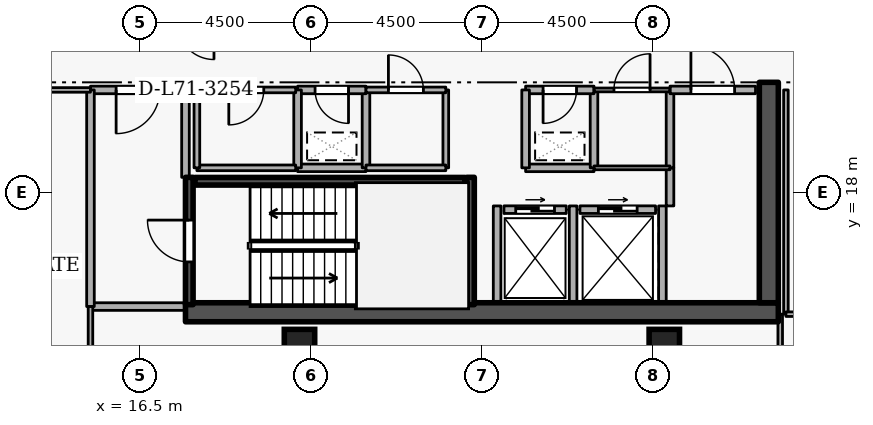
"""IFC4 building model, lengths in metres.
Left out: names, types, materials, properties, quantities, classifications, styles, units other than length and angle.
Written with IfcOpenShell. Run it as: python <this file> out.ifc"""

import sys

from ifc_helpers import new_model, si_unit, direction, frame, frame_2d, origin, origin_2d, place, context, subcontext, project, spatial, rectangle, extrude, element, fill, save


model = new_model("IFC4")
c1 = context("Model", 3, precision=1e-05, world=origin(), true_north=direction((0.0, 1.0)))
c2 = subcontext(c1, "Body", "Model", "MODEL_VIEW")
j1 = project(units=[si_unit("LENGTHUNIT", "METRE"), si_unit("PLANEANGLEUNIT", "RADIAN")], contexts=[c1])
p1 = place(None, origin())
s1 = spatial("IfcSite", under=j1, at=p1, CompositionType="ELEMENT")
p2 = place(p1, origin())
s2 = spatial("IfcBuilding", under=s1, at=p2, CompositionType="ELEMENT")
p3 = place(p2, frame((0.0, 0.0, 265.5)))
s3 = spatial("IfcBuildingStorey", under=s2, at=p3, CompositionType="ELEMENT", Elevation=265.5)
p4 = place(p3, frame((17.7, 14.85, 0.0), z_axis=(0.0, 0.0, 1.0), x_axis=(1.0, 0.0, 0.0)))
e1 = element("IfcWall", 1, at=p4, inside=s3, PredefinedType="SHEAR", context=c2, shape_type="SweptSolid", body=[
    extrude(rectangle(XDim=15.6, YDim=0.5, at=frame_2d((7.8, 0.0))), origin(), (0.0, 0.0, 1.0), 3.6),
])
p5 = place(p3, frame((33.05, 15.1, 0.0), z_axis=(0.0, 0.0, 1.0), x_axis=(0.0, 1.0, 0.0)))
e2 = element("IfcWall", 2, at=p5, inside=s3, PredefinedType="SHEAR", context=c2, shape_type="SweptSolid", body=[
    extrude(rectangle(XDim=5.8, YDim=0.5, at=frame_2d((2.9, 0.0))), origin(), (0.0, 0.0, 1.0), 3.6),
])
for number, where, z_axis, x_axis in (
    (3, (20.7, 14.0, 0.0), (0.0, 0.0, 1.0), (1.0, 0.0, 0.0)),
    (4, (30.3, 14.0, 0.0), (0.0, 0.0, 1.0), (1.0, 0.0, 0.0)),
):
    element("IfcColumn", number, at=place(p3, frame(where, z_axis=z_axis, x_axis=x_axis)), inside=s3, PredefinedType="COLUMN", context=c2, shape_type="SweptSolid", body=[
        extrude(rectangle(XDim=0.8, YDim=0.8, at=origin_2d()), origin(), (0.0, 0.0, 1.0), 3.6),
    ])
p6 = place(p3, frame((26.08, 17.55, 0.0), z_axis=(0.0, 0.0, 1.0), x_axis=(1.0, 0.0, 0.0)))
e5 = element("IfcWall", 5, at=p6, inside=s3, PredefinedType="STANDARD", context=c2, shape_type="SweptSolid", body=[
    extrude(rectangle(XDim=1.64, YDim=0.2, at=frame_2d((0.82, 0.0))), origin(), (0.0, 0.0, 1.0), 3.34),
])
p7 = place(p6, frame((0.31, 0.0, 0.0)))
e6 = element("IfcOpeningElement", 6, at=p7, cuts=e5, PredefinedType="OPENING", context=c2, shape_type="SweptSolid", body=[
    extrude(rectangle(XDim=1.02, YDim=2.06, at=frame_2d((0.51, 1.03))), frame((0.0, 0.11, 0.0), z_axis=(0.0, -1.0, 0.0), x_axis=(1.0, 0.0, 0.0)), (0.0, 0.0, 1.0), 0.22),
])
p8 = place(p3, frame((28.08, 17.55, 0.0), z_axis=(0.0, 0.0, 1.0), x_axis=(1.0, 0.0, 0.0)))
e7 = element("IfcWall", 7, at=p8, inside=s3, PredefinedType="STANDARD", context=c2, shape_type="SweptSolid", body=[
    extrude(rectangle(XDim=1.99, YDim=0.2, at=frame_2d((0.995, 0.0))), origin(), (0.0, 0.0, 1.0), 3.34),
])
p9 = place(p8, frame((0.485, 0.0, 0.0)))
e8 = element("IfcOpeningElement", 8, at=p9, cuts=e7, PredefinedType="OPENING", context=c2, shape_type="SweptSolid", body=[
    extrude(rectangle(XDim=1.02, YDim=2.06, at=frame_2d((0.51, 1.03))), frame((0.0, 0.11, 0.0), z_axis=(0.0, -1.0, 0.0), x_axis=(1.0, 0.0, 0.0)), (0.0, 0.0, 1.0), 0.22),
])
for number, where, z_axis, x_axis in (
    (9, (27.9, 15.112, 0.0), (0.0, 0.0, 1.0), (0.0, 1.0, 0.0)),
    (10, (25.9, 15.112, 0.0), (0.0, 0.0, 1.0), (0.0, 1.0, 0.0)),
    (11, (30.25, 15.112, 0.0), (0.0, 0.0, 1.0), (0.0, 1.0, 0.0)),
):
    element("IfcWall", number, at=place(p3, frame(where, z_axis=z_axis, x_axis=x_axis)), inside=s3, PredefinedType="STANDARD", context=c2, shape_type="SweptSolid", body=[
        extrude(rectangle(XDim=2.536, YDim=0.2, at=frame_2d((1.268, 0.0))), origin(), (0.0, 0.0, 1.0), 3.34),
    ])
p10 = place(p3, frame((17.8, 15.05, 0.0), z_axis=(0.0, 0.0, 1.0), x_axis=(0.0, 1.0, 0.0)))
e12 = element("IfcWall", 12, at=p10, inside=s3, PredefinedType="SHEAR", context=c2, shape_type="SweptSolid", body=[
    extrude(rectangle(XDim=3.35, YDim=0.2, at=frame_2d((1.675, 0.0))), origin(), (0.0, 0.0, 1.0), 3.6),
])
p11 = place(p10, frame((1.125, 0.0, 0.0)))
e13 = element("IfcOpeningElement", 13, at=p11, cuts=e12, PredefinedType="OPENING", context=c2, shape_type="SweptSolid", body=[
    extrude(rectangle(XDim=1.1, YDim=2.1, at=frame_2d((0.55, 1.05))), frame((0.0, 0.11, 0.0), z_axis=(0.0, -1.0, 0.0), x_axis=(1.0, 0.0, 0.0)), (0.0, 0.0, 1.0), 0.22),
])
p12 = place(p3, frame((25.2, 18.4, 0.0), z_axis=(0.0, 0.0, 1.0), x_axis=(0.0, -1.0, 0.0)))
e14 = element("IfcWall", 14, at=p12, inside=s3, PredefinedType="SHEAR", context=c2, shape_type="SweptSolid", body=[
    extrude(rectangle(XDim=3.35, YDim=0.2, at=frame_2d((1.675, 0.0))), origin(), (0.0, 0.0, 1.0), 3.6),
])
p13 = place(p3, frame((25.05, 18.297, 0.0), z_axis=(0.0, 0.0, 1.0), x_axis=(-1.0, 0.0, 0.0)))
e15 = element("IfcWall", 15, at=p13, inside=s3, PredefinedType="SHEAR", context=c2, shape_type="SweptSolid", body=[
    extrude(rectangle(XDim=7.1, YDim=0.2, at=frame_2d((3.55, 0.0))), origin(), (0.0, 0.0, 1.0), 3.6),
])
p14 = place(p3, frame((15.2, 15.0, 0.0), z_axis=(0.0, 0.0, 1.0), x_axis=(1.0, 0.0, 0.0)))
e16 = element("IfcWall", 16, at=p14, inside=s3, PredefinedType="STANDARD", context=c2, shape_type="SweptSolid", body=[
    extrude(rectangle(XDim=2.5, YDim=0.2, at=frame_2d((1.25, 0.0))), origin(), (0.0, 0.0, 1.0), 3.34),
])
p15 = place(p3, frame((17.7, 18.4, 0.0), z_axis=(0.0, 0.0, 1.0), x_axis=(0.0, 1.0, 0.0)))
e17 = element("IfcWall", 17, at=p15, inside=s3, PredefinedType="STANDARD", context=c2, shape_type="SweptSolid", body=[
    extrude(rectangle(XDim=2.3, YDim=0.2, at=frame_2d((1.15, 0.0))), origin(), (0.0, 0.0, 1.0), 2.545),
])
p16 = place(p3, frame((17.7, 20.7, 0.0), z_axis=(0.0, 0.0, 1.0), x_axis=(-1.0, 0.0, 0.0)))
e18 = element("IfcWall", 18, at=p16, inside=s3, PredefinedType="STANDARD", context=c2, shape_type="SweptSolid", body=[
    extrude(rectangle(XDim=2.5, YDim=0.2, at=frame_2d((1.25, 0.0))), origin(), (0.0, 0.0, 1.0), 3.34),
])
p17 = place(p16, frame((0.675, 0.0, 0.0)))
e19 = element("IfcOpeningElement", 19, at=p17, cuts=e18, PredefinedType="OPENING", context=c2, shape_type="SweptSolid", body=[
    extrude(rectangle(XDim=1.15, YDim=2.1, at=frame_2d((0.575, 1.05))), frame((0.0, 0.11, 0.0), z_axis=(0.0, -1.0, 0.0), x_axis=(1.0, 0.0, 0.0)), (0.0, 0.0, 1.0), 0.22),
])
p18 = place(p3, frame((15.2, 20.7, 0.0), z_axis=(0.0, 0.0, 1.0), x_axis=(0.0, -1.0, 0.0)))
e20 = element("IfcWall", 20, at=p18, inside=s3, PredefinedType="STANDARD", context=c2, shape_type="SweptSolid", body=[
    extrude(rectangle(XDim=5.7, YDim=0.2, at=frame_2d((2.85, 0.0))), origin(), (0.0, 0.0, 1.0), 3.34),
])
p19 = place(p3, frame((26.65, 18.65, 0.0), z_axis=(0.0, 0.0, 1.0), x_axis=(1.0, 0.0, 0.0)))
e21 = element("IfcWall", 21, at=p19, inside=s3, PredefinedType="STANDARD", context=c2, shape_type="SweptSolid", body=[
    extrude(rectangle(XDim=1.8, YDim=0.2, at=frame_2d((0.9, 0.0))), origin(), (0.0, 0.0, 1.0), 3.34),
])
p20 = place(p3, frame((28.45, 18.65, 0.0), z_axis=(0.0, 0.0, 1.0), x_axis=(0.0, 1.0, 0.0)))
e22 = element("IfcWall", 22, at=p20, inside=s3, PredefinedType="STANDARD", context=c2, shape_type="SweptSolid", body=[
    extrude(rectangle(XDim=2.05, YDim=0.2, at=frame_2d((1.025, 0.0))), origin(), (0.0, 0.0, 1.0), 3.34),
])
p21 = place(p3, frame((28.45, 20.7, 0.0), z_axis=(0.0, 0.0, 1.0), x_axis=(-1.0, 0.0, 0.0)))
e23 = element("IfcWall", 23, at=p21, inside=s3, PredefinedType="STANDARD", context=c2, shape_type="SweptSolid", body=[
    extrude(rectangle(XDim=1.8, YDim=0.2, at=frame_2d((0.9, 0.0))), origin(), (0.0, 0.0, 1.0), 3.34),
])
p22 = place(p21, frame((0.46, 0.0, 0.0)))
e24 = element("IfcOpeningElement", 24, at=p22, cuts=e23, PredefinedType="OPENING", context=c2, shape_type="SweptSolid", body=[
    extrude(rectangle(XDim=0.88, YDim=2.04, at=frame_2d((0.44, 1.02))), frame((0.0, 0.11, 0.0), z_axis=(0.0, -1.0, 0.0), x_axis=(1.0, 0.0, 0.0)), (0.0, 0.0, 1.0), 0.22),
])
p23 = place(p3, frame((26.65, 20.7, 0.0), z_axis=(0.0, 0.0, 1.0), x_axis=(0.0, -1.0, 0.0)))
e25 = element("IfcWall", 25, at=p23, inside=s3, PredefinedType="STANDARD", context=c2, shape_type="SweptSolid", body=[
    extrude(rectangle(XDim=2.05, YDim=0.2, at=frame_2d((1.025, 0.0))), origin(), (0.0, 0.0, 1.0), 3.34),
])
p24 = place(p3, frame((20.65, 18.65, 0.0), z_axis=(0.0, 0.0, 1.0), x_axis=(1.0, 0.0, 0.0)))
e26 = element("IfcWall", 26, at=p24, inside=s3, PredefinedType="STANDARD", context=c2, shape_type="SweptSolid", body=[
    extrude(rectangle(XDim=1.8, YDim=0.2, at=frame_2d((0.9, 0.0))), origin(), (0.0, 0.0, 1.0), 3.34),
])
p25 = place(p3, frame((22.45, 18.65, 0.0), z_axis=(0.0, 0.0, 1.0), x_axis=(0.0, 1.0, 0.0)))
e27 = element("IfcWall", 27, at=p25, inside=s3, PredefinedType="STANDARD", context=c2, shape_type="SweptSolid", body=[
    extrude(rectangle(XDim=2.05, YDim=0.2, at=frame_2d((1.025, 0.0))), origin(), (0.0, 0.0, 1.0), 3.34),
])
p26 = place(p3, frame((22.45, 20.7, 0.0), z_axis=(0.0, 0.0, 1.0), x_axis=(-1.0, 0.0, 0.0)))
e28 = element("IfcWall", 28, at=p26, inside=s3, PredefinedType="STANDARD", context=c2, shape_type="SweptSolid", body=[
    extrude(rectangle(XDim=1.8, YDim=0.2, at=frame_2d((0.9, 0.0))), origin(), (0.0, 0.0, 1.0), 3.34),
])
p27 = place(p26, frame((0.46, 0.0, 0.0)))
e29 = element("IfcOpeningElement", 29, at=p27, cuts=e28, PredefinedType="OPENING", context=c2, shape_type="SweptSolid", body=[
    extrude(rectangle(XDim=0.88, YDim=2.04, at=frame_2d((0.44, 1.02))), frame((0.0, 0.11, 0.0), z_axis=(0.0, -1.0, 0.0), x_axis=(1.0, 0.0, 0.0)), (0.0, 0.0, 1.0), 0.22),
])
p28 = place(p3, frame((20.65, 20.7, 0.0), z_axis=(0.0, 0.0, 1.0), x_axis=(0.0, -1.0, 0.0)))
e30 = element("IfcWall", 30, at=p28, inside=s3, PredefinedType="STANDARD", context=c2, shape_type="SweptSolid", body=[
    extrude(rectangle(XDim=2.05, YDim=0.2, at=frame_2d((1.025, 0.0))), origin(), (0.0, 0.0, 1.0), 3.34),
])
p29 = place(p3, frame((30.45, 17.648, 0.0), z_axis=(0.0, 0.0, 1.0), x_axis=(0.0, 1.0, 0.0)))
e31 = element("IfcWall", 31, at=p29, inside=s3, PredefinedType="STANDARD", context=c2, shape_type="SweptSolid", body=[
    extrude(rectangle(XDim=1.002, YDim=0.2, at=frame_2d((0.501, 0.0))), origin(), (0.0, 0.0, 1.0), 3.34),
])
p30 = place(p3, frame((30.45, 18.65, 0.0), z_axis=(0.0, 0.0, 1.0), x_axis=(0.0, 1.0, 0.0)))
e32 = element("IfcWall", 32, at=p30, inside=s3, PredefinedType="STANDARD", context=c2, shape_type="SweptSolid", body=[
    extrude(rectangle(XDim=2.05, YDim=0.2, at=frame_2d((1.025, 0.0))), origin(), (0.0, 0.0, 1.0), 3.34),
])
p31 = place(p3, frame((30.45, 20.7, 0.0), z_axis=(0.0, 0.0, 1.0), x_axis=(1.0, 0.0, 0.0)))
e33 = element("IfcWall", 33, at=p31, inside=s3, PredefinedType="STANDARD", context=c2, shape_type="SweptSolid", body=[
    extrude(rectangle(XDim=2.25, YDim=0.2, at=frame_2d((1.125, 0.0))), origin(), (0.0, 0.0, 1.0), 3.34),
])
p32 = place(p31, frame((0.55, 0.0, 0.0)))
e34 = element("IfcOpeningElement", 34, at=p32, cuts=e33, PredefinedType="OPENING", context=c2, shape_type="SweptSolid", body=[
    extrude(rectangle(XDim=1.15, YDim=2.1, at=frame_2d((0.575, 1.05))), frame((0.0, 0.11, 0.0), z_axis=(0.0, -1.0, 0.0), x_axis=(1.0, 0.0, 0.0)), (0.0, 0.0, 1.0), 0.22),
])
p33 = place(p3, frame((18.0, 18.65, 0.0), z_axis=(0.0, 0.0, 1.0), x_axis=(1.0, 0.0, 0.0)))
e35 = element("IfcWall", 35, at=p33, inside=s3, PredefinedType="PARTITIONING", context=c2, shape_type="SweptSolid", body=[
    extrude(rectangle(XDim=2.6, YDim=0.15, at=frame_2d((1.3, 0.0))), origin(), (0.0, 0.0, 1.0), 3.34),
])
p34 = place(p3, frame((20.6, 20.7, 0.0), z_axis=(0.0, 0.0, 1.0), x_axis=(-1.0, 0.0, 0.0)))
e36 = element("IfcWall", 36, at=p34, inside=s3, PredefinedType="PARTITIONING", context=c2, shape_type="SweptSolid", body=[
    extrude(rectangle(XDim=2.6, YDim=0.15, at=frame_2d((1.3, 0.0))), origin(), (0.0, 0.0, 1.0), 3.34),
])
p35 = place(p34, frame((0.84, 0.0, 0.0)))
e37 = element("IfcOpeningElement", 37, at=p35, cuts=e36, PredefinedType="OPENING", context=c2, shape_type="SweptSolid", body=[
    extrude(rectangle(XDim=0.92, YDim=2.08, at=frame_2d((0.46, 1.04))), frame((0.0, 0.085, 0.0), z_axis=(0.0, -1.0, 0.0), x_axis=(1.0, 0.0, 0.0)), (0.0, 0.0, 1.0), 0.17),
])
p36 = place(p3, frame((18.0, 20.7, 0.0), z_axis=(0.0, 0.0, 1.0), x_axis=(0.0, -1.0, 0.0)))
e38 = element("IfcWall", 38, at=p36, inside=s3, PredefinedType="PARTITIONING", context=c2, shape_type="SweptSolid", body=[
    extrude(rectangle(XDim=2.05, YDim=0.15, at=frame_2d((1.025, 0.0))), origin(), (0.0, 0.0, 1.0), 2.545),
])
p37 = place(p3, frame((24.55, 20.7, 0.0), z_axis=(0.0, 0.0, 1.0), x_axis=(0.0, -1.0, 0.0)))
e39 = element("IfcWall", 39, at=p37, inside=s3, PredefinedType="PARTITIONING", context=c2, shape_type="SweptSolid", body=[
    extrude(rectangle(XDim=2.05, YDim=0.15, at=frame_2d((1.025, 0.0))), origin(), (0.0, 0.0, 1.0), 3.34),
])
p38 = place(p3, frame((24.55, 18.65, 0.0), z_axis=(0.0, 0.0, 1.0), x_axis=(-1.0, 0.0, 0.0)))
e40 = element("IfcWall", 40, at=p38, inside=s3, PredefinedType="PARTITIONING", context=c2, shape_type="SweptSolid", body=[
    extrude(rectangle(XDim=2.1, YDim=0.15, at=frame_2d((1.05, 0.0))), origin(), (0.0, 0.0, 1.0), 3.34),
])
p39 = place(p3, frame((22.45, 20.7, 0.0), z_axis=(0.0, 0.0, 1.0), x_axis=(1.0, 0.0, 0.0)))
e41 = element("IfcWall", 41, at=p39, inside=s3, PredefinedType="PARTITIONING", context=c2, shape_type="SweptSolid", body=[
    extrude(rectangle(XDim=2.1, YDim=0.15, at=frame_2d((1.05, 0.0))), origin(), (0.0, 0.0, 1.0), 3.34),
])
p40 = place(p39, frame((0.59, 0.0, 0.0)))
e42 = element("IfcOpeningElement", 42, at=p40, cuts=e41, PredefinedType="OPENING", context=c2, shape_type="SweptSolid", body=[
    extrude(rectangle(XDim=0.92, YDim=2.08, at=frame_2d((0.46, 1.04))), frame((0.0, 0.085, 0.0), z_axis=(0.0, -1.0, 0.0), x_axis=(1.0, 0.0, 0.0)), (0.0, 0.0, 1.0), 0.17),
])
p41 = place(p3, frame((30.45, 18.65, 0.0), z_axis=(0.0, 0.0, 1.0), x_axis=(-1.0, 0.0, 0.0)))
e43 = element("IfcWall", 43, at=p41, inside=s3, PredefinedType="PARTITIONING", context=c2, shape_type="SweptSolid", body=[
    extrude(rectangle(XDim=2.0, YDim=0.1, at=frame_2d((1.0, 0.0))), origin(), (0.0, 0.0, 1.0), 3.34),
])
p42 = place(p3, frame((28.45, 20.7, 0.0), z_axis=(0.0, 0.0, 1.0), x_axis=(1.0, 0.0, 0.0)))
e44 = element("IfcWall", 44, at=p42, inside=s3, PredefinedType="PARTITIONING", context=c2, shape_type="SweptSolid", body=[
    extrude(rectangle(XDim=2.0, YDim=0.1, at=frame_2d((1.0, 0.0))), origin(), (0.0, 0.0, 1.0), 3.34),
])
p43 = place(p42, frame((0.525, 0.0, 0.0)))
e45 = element("IfcOpeningElement", 45, at=p43, cuts=e44, PredefinedType="OPENING", context=c2, shape_type="SweptSolid", body=[
    extrude(rectangle(XDim=0.95, YDim=2.1, at=frame_2d((0.475, 1.05))), frame((0.0, 0.06, 0.0), z_axis=(0.0, -1.0, 0.0), x_axis=(1.0, 0.0, 0.0)), (0.0, 0.0, 1.0), 0.12),
])
p44 = place(p3, frame((33.5, 20.7, 0.0), z_axis=(0.0, 0.0, 1.0), x_axis=(0.0, -1.0, 0.0)))
e46 = element("IfcWall", 46, at=p44, inside=s3, PredefinedType="PARTITIONING", context=c2, shape_type="SweptSolid", body=[
    extrude(rectangle(XDim=5.9, YDim=0.12, at=frame_2d((2.95, 0.0))), origin(), (0.0, 0.0, 1.0), 3.34),
])
p45 = place(p3, frame((33.5, 14.8, 0.0), z_axis=(0.0, 0.0, 1.0), x_axis=(1.0, 0.0, 0.0)))
e47 = element("IfcWall", 47, at=p45, inside=s3, PredefinedType="PARTITIONING", context=c2, shape_type="SweptSolid", body=[
    extrude(rectangle(XDim=1.85, YDim=0.12, at=frame_2d((0.925, 0.0))), origin(), (0.0, 0.0, 1.0), 3.34),
])
p46 = place(p45, frame((0.45, 0.0, 0.0)))
e48 = element("IfcOpeningElement", 48, at=p46, cuts=e47, PredefinedType="OPENING", context=c2, shape_type="SweptSolid", body=[
    extrude(rectangle(XDim=0.95, YDim=2.1, at=frame_2d((0.475, 1.05))), frame((0.0, 0.07, 0.0), z_axis=(0.0, -1.0, 0.0), x_axis=(1.0, 0.0, 0.0)), (0.0, 0.0, 1.0), 0.14),
])
p47 = place(p3, frame((33.35, 3.28, 0.0), z_axis=(0.0, 0.0, 1.0), x_axis=(0.0, 1.0, 0.0)))
e49 = element("IfcWall", 49, at=p47, inside=s3, PredefinedType="PARTITIONING", context=c2, shape_type="SweptSolid", body=[
    extrude(rectangle(XDim=11.52, YDim=0.12, at=frame_2d((5.76, 0.0))), origin(), (0.0, 0.0, 1.0), 3.34),
])
p48 = place(p3, frame((13.25, 20.7, 0.0), z_axis=(0.0, 0.0, 1.0), x_axis=(1.0, 0.0, 0.0)))
e50 = element("IfcWall", 50, at=p48, inside=s3, PredefinedType="PARTITIONING", context=c2, shape_type="SweptSolid", body=[
    extrude(rectangle(XDim=1.95, YDim=0.12, at=frame_2d((0.975, 0.0))), origin(), (0.0, 0.0, 1.0), 3.34),
])
p49 = place(p3, frame((15.2, 15.0, 0.0), z_axis=(0.0, 0.0, 1.0), x_axis=(0.0, -1.0, 0.0)))
e51 = element("IfcWall", 51, at=p49, inside=s3, PredefinedType="PARTITIONING", context=c2, shape_type="SweptSolid", body=[
    extrude(rectangle(XDim=11.72, YDim=0.12, at=frame_2d((5.86, 0.0))), origin(), (0.0, 0.0, 1.0), 3.34),
])
p50 = place(p7, origin())
e52 = element("IfcDoor", 52, at=p50, inside=s3, OperationType="SLIDING_TO_LEFT", PredefinedType="DOOR", context=c2, shape_type="SweptSolid", body=[
    extrude(rectangle(XDim=1.02, YDim=2.06, at=frame_2d((0.51, 1.03))), frame((0.0, 0.025, 0.0), z_axis=(0.0, -1.0, 0.0), x_axis=(1.0, 0.0, 0.0)), (0.0, 0.0, 1.0), 0.05),
])
fill(e6, e52)
p51 = place(p9, origin())
e53 = element("IfcDoor", 53, at=p51, inside=s3, OperationType="SLIDING_TO_LEFT", PredefinedType="DOOR", context=c2, shape_type="SweptSolid", body=[
    extrude(rectangle(XDim=1.02, YDim=2.06, at=frame_2d((0.51, 1.03))), frame((0.0, 0.025, 0.0), z_axis=(0.0, -1.0, 0.0), x_axis=(1.0, 0.0, 0.0)), (0.0, 0.0, 1.0), 0.05),
])
fill(e8, e53)
p52 = place(p11, origin())
e54 = element("IfcDoor", 54, at=p52, inside=s3, OperationType="SINGLE_SWING_RIGHT", PredefinedType="DOOR", context=c2, shape_type="SweptSolid", body=[
    extrude(rectangle(XDim=1.1, YDim=2.1, at=frame_2d((0.55, 1.05))), frame((0.0, 0.025, 0.0), z_axis=(0.0, -1.0, 0.0), x_axis=(1.0, 0.0, 0.0)), (0.0, 0.0, 1.0), 0.05),
])
fill(e13, e54)
p53 = place(p17, origin())
e55 = element("IfcDoor", 55, at=p53, inside=s3, OperationType="SINGLE_SWING_RIGHT", PredefinedType="DOOR", context=c2, shape_type="SweptSolid", body=[
    extrude(rectangle(XDim=1.15, YDim=2.1, at=frame_2d((0.575, 1.05))), frame((0.0, 0.025, 0.0), z_axis=(0.0, -1.0, 0.0), x_axis=(1.0, 0.0, 0.0)), (0.0, 0.0, 1.0), 0.05),
])
fill(e19, e55)
p54 = place(p22, origin())
e56 = element("IfcDoor", 56, at=p54, inside=s3, OperationType="SINGLE_SWING_RIGHT", PredefinedType="DOOR", context=c2, shape_type="SweptSolid", body=[
    extrude(rectangle(XDim=0.88, YDim=2.04, at=frame_2d((0.44, 1.02))), frame((0.0, 0.025, 0.0), z_axis=(0.0, -1.0, 0.0), x_axis=(1.0, 0.0, 0.0)), (0.0, 0.0, 1.0), 0.05),
])
fill(e24, e56)
p55 = place(p27, origin())
e57 = element("IfcDoor", 57, at=p55, inside=s3, OperationType="SINGLE_SWING_LEFT", PredefinedType="DOOR", context=c2, shape_type="SweptSolid", body=[
    extrude(rectangle(XDim=0.88, YDim=2.04, at=frame_2d((0.44, 1.02))), frame((0.0, 0.025, 0.0), z_axis=(0.0, -1.0, 0.0), x_axis=(1.0, 0.0, 0.0)), (0.0, 0.0, 1.0), 0.05),
])
fill(e29, e57)
p56 = place(p35, origin())
e58 = element("IfcDoor", 58, at=p56, inside=s3, OperationType="SINGLE_SWING_RIGHT", PredefinedType="DOOR", context=c2, shape_type="SweptSolid", body=[
    extrude(rectangle(XDim=0.92, YDim=2.08, at=frame_2d((0.46, 1.04))), frame((0.0, 0.025, 0.0), z_axis=(0.0, -1.0, 0.0), x_axis=(1.0, 0.0, 0.0)), (0.0, 0.0, 1.0), 0.05),
])
fill(e37, e58)
p57 = place(p40, origin())
e59 = element("IfcDoor", 59, at=p57, inside=s3, OperationType="SINGLE_SWING_LEFT", PredefinedType="DOOR", context=c2, shape_type="SweptSolid", body=[
    extrude(rectangle(XDim=0.92, YDim=2.08, at=frame_2d((0.46, 1.04))), frame((0.0, 0.025, 0.0), z_axis=(0.0, -1.0, 0.0), x_axis=(1.0, 0.0, 0.0)), (0.0, 0.0, 1.0), 0.05),
])
fill(e42, e59)
p58 = place(p43, origin())
e60 = element("IfcDoor", 60, at=p58, inside=s3, OperationType="SINGLE_SWING_RIGHT", PredefinedType="DOOR", context=c2, shape_type="SweptSolid", body=[
    extrude(rectangle(XDim=0.95, YDim=2.1, at=frame_2d((0.475, 1.05))), frame((0.0, 0.025, 0.0), z_axis=(0.0, -1.0, 0.0), x_axis=(1.0, 0.0, 0.0)), (0.0, 0.0, 1.0), 0.05),
])
fill(e45, e60)
p59 = place(p32, origin())
e61 = element("IfcDoor", 61, at=p59, inside=s3, OperationType="SINGLE_SWING_LEFT", PredefinedType="DOOR", context=c2, shape_type="SweptSolid", body=[
    extrude(rectangle(XDim=1.15, YDim=2.1, at=frame_2d((0.575, 1.05))), frame((0.0, 0.025, 0.0), z_axis=(0.0, -1.0, 0.0), x_axis=(1.0, 0.0, 0.0)), (0.0, 0.0, 1.0), 0.05),
])
fill(e34, e61)
save(model, sys.argv[1])
